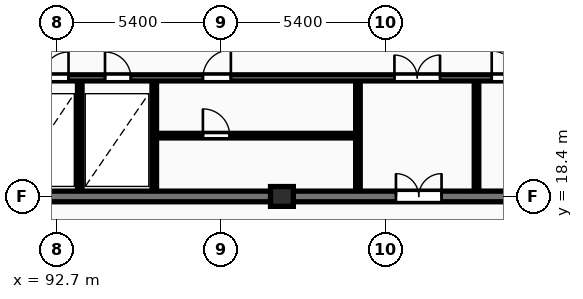
"""IFC4 building model, lengths in metres.
Left out: names, types, materials, properties, quantities, classifications, styles, units other than length and angle.
Written with IfcOpenShell. Run it as: python <this file> out.ifc"""

import sys

from ifc_helpers import new_model, si_unit, direction, frame, frame_2d, origin, origin_2d, place, context, subcontext, project, spatial, rectangle, extrude, element, fill, save


model = new_model("IFC4")
c1 = context("Model", 3, precision=1e-05, world=origin(), true_north=direction((0.0, 1.0)))
c2 = subcontext(c1, "Body", "Model", "MODEL_VIEW")
j1 = project(units=[si_unit("LENGTHUNIT", "METRE"), si_unit("PLANEANGLEUNIT", "RADIAN")], contexts=[c1])
p1 = place(None, origin())
s1 = spatial("IfcSite", under=j1, at=p1, CompositionType="ELEMENT")
p2 = place(p1, origin())
s2 = spatial("IfcBuilding", under=s1, at=p2, CompositionType="ELEMENT")
p3 = place(p2, frame((0.0, 0.0, 201.1)))
s3 = spatial("IfcBuildingStorey", under=s2, at=p3, CompositionType="ELEMENT", Elevation=201.1)
p4 = place(p3, frame((100.1, 18.4, 0.0), z_axis=(0.0, 0.0, 1.0), x_axis=(1.0, 0.0, 0.0)))
e1 = element("IfcColumn", 1, at=p4, inside=s3, PredefinedType="COLUMN", context=c2, shape_type="SweptSolid", body=[
    extrude(rectangle(XDim=0.75, YDim=0.65, at=origin_2d()), origin(), (0.0, 0.0, 1.0), 3.25),
])
p5 = place(p3, frame((81.925, 18.4, 0.0), z_axis=(0.0, 0.0, 1.0), x_axis=(1.0, 0.0, 0.0)))
e2 = element("IfcWall", 2, at=p5, inside=s3, PredefinedType="SHEAR", context=c2, shape_type="SweptSolid", body=[
    extrude(rectangle(XDim=36.265, YDim=0.35, at=frame_2d((18.132, 0.0))), origin(), (0.0, 0.0, 1.0), 3.25),
])
p6 = place(p5, frame((5.675, 0.0, 0.0)))
e3 = element("IfcOpeningElement", 3, at=p6, cuts=e2, PredefinedType="OPENING", context=c2, shape_type="SweptSolid", body=[
    extrude(rectangle(XDim=1.0, YDim=2.15, at=frame_2d((0.5, 1.075))), frame((0.0, 0.185, 0.0), z_axis=(0.0, -1.0, 0.0), x_axis=(1.0, 0.0, 0.0)), (0.0, 0.0, 1.0), 0.37),
])
p7 = place(p5, frame((21.925, 0.0, 0.0)))
e4 = element("IfcOpeningElement", 4, at=p7, cuts=e2, PredefinedType="OPENING", context=c2, shape_type="SweptSolid", body=[
    extrude(rectangle(XDim=1.5, YDim=2.2, at=frame_2d((0.75, 1.1))), frame((0.0, 0.185, 0.0), z_axis=(0.0, -1.0, 0.0), x_axis=(1.0, 0.0, 0.0)), (0.0, 0.0, 1.0), 0.37),
])
p8 = place(p5, frame((29.875, 0.0, 0.0)))
e5 = element("IfcOpeningElement", 5, at=p8, cuts=e2, PredefinedType="OPENING", context=c2, shape_type="SweptSolid", body=[
    extrude(rectangle(XDim=1.0, YDim=2.15, at=frame_2d((0.5, 1.075))), frame((0.0, 0.185, 0.0), z_axis=(0.0, -1.0, 0.0), x_axis=(1.0, 0.0, 0.0)), (0.0, 0.0, 1.0), 0.37),
])
for number, where, z_axis, x_axis in (
    (6, (93.45, 18.6, 0.0), (0.0, 0.0, 1.0), (0.0, 1.0, 0.0)),
    (7, (95.9, 18.6, 0.0), (0.0, 0.0, 1.0), (0.0, 1.0, 0.0)),
):
    element("IfcWall", number, at=place(p3, frame(where, z_axis=z_axis, x_axis=x_axis)), inside=s3, PredefinedType="PARTITIONING", context=c2, shape_type="SweptSolid", body=[
        extrude(rectangle(XDim=3.6, YDim=0.15, at=frame_2d((1.8, 0.0))), origin(), (0.0, 0.0, 1.0), 2.97),
    ])
p9 = place(p3, frame((95.9, 20.4, 0.0), z_axis=(0.0, 0.0, 1.0), x_axis=(1.0, 0.0, 0.0)))
e8 = element("IfcWall", 8, at=p9, inside=s3, PredefinedType="PARTITIONING", context=c2, shape_type="SweptSolid", body=[
    extrude(rectangle(XDim=6.7, YDim=0.15, at=frame_2d((3.35, 0.0))), origin(), (0.0, 0.0, 1.0), 2.97),
])
p10 = place(p9, frame((1.6, 0.0, 0.0)))
e9 = element("IfcOpeningElement", 9, at=p10, cuts=e8, PredefinedType="OPENING", context=c2, shape_type="SweptSolid", body=[
    extrude(rectangle(XDim=0.88, YDim=2.06, at=frame_2d((0.44, 1.03))), frame((0.0, 0.085, 0.0), z_axis=(0.0, -1.0, 0.0), x_axis=(1.0, 0.0, 0.0)), (0.0, 0.0, 1.0), 0.17),
])
for number, where, z_axis, x_axis in (
    (10, (102.6, 18.6, 0.0), (0.0, 0.0, 1.0), (0.0, 1.0, 0.0)),
    (11, (106.5, 18.6, 0.0), (0.0, 0.0, 1.0), (0.0, 1.0, 0.0)),
):
    element("IfcWall", number, at=place(p3, frame(where, z_axis=z_axis, x_axis=x_axis)), inside=s3, PredefinedType="PARTITIONING", context=c2, shape_type="SweptSolid", body=[
        extrude(rectangle(XDim=3.6, YDim=0.15, at=frame_2d((1.8, 0.0))), origin(), (0.0, 0.0, 1.0), 2.97),
    ])
p11 = place(p3, frame((91.08, 22.3, 0.0), z_axis=(0.0, 0.0, 1.0), x_axis=(1.0, 0.0, 0.0)))
e12 = element("IfcWall", 12, at=p11, inside=s3, PredefinedType="PARTITIONING", context=c2, shape_type="SweptSolid", body=[
    extrude(rectangle(XDim=19.14, YDim=0.2, at=frame_2d((9.57, 0.0))), origin(), (0.0, 0.0, 1.0), 2.97),
])
p12 = place(p11, frame((1.15, 0.0, 0.0)))
e13 = element("IfcOpeningElement", 13, at=p12, cuts=e12, PredefinedType="OPENING", context=c2, shape_type="SweptSolid", body=[
    extrude(rectangle(XDim=0.85, YDim=2.05, at=frame_2d((0.425, 1.025))), frame((0.0, 0.11, 0.0), z_axis=(0.0, -1.0, 0.0), x_axis=(1.0, 0.0, 0.0)), (0.0, 0.0, 1.0), 0.22),
])
p13 = place(p11, frame((3.2, 0.0, 0.0)))
e14 = element("IfcOpeningElement", 14, at=p13, cuts=e12, PredefinedType="OPENING", context=c2, shape_type="SweptSolid", body=[
    extrude(rectangle(XDim=0.85, YDim=2.05, at=frame_2d((0.425, 1.025))), frame((0.0, 0.11, 0.0), z_axis=(0.0, -1.0, 0.0), x_axis=(1.0, 0.0, 0.0)), (0.0, 0.0, 1.0), 0.22),
])
p14 = place(p11, frame((12.72, 0.0, 0.0)))
e15 = element("IfcOpeningElement", 15, at=p14, cuts=e12, PredefinedType="OPENING", context=c2, shape_type="SweptSolid", body=[
    extrude(rectangle(XDim=1.5, YDim=2.2, at=frame_2d((0.75, 1.1))), frame((0.0, 0.11, 0.0), z_axis=(0.0, -1.0, 0.0), x_axis=(1.0, 0.0, 0.0)), (0.0, 0.0, 1.0), 0.22),
])
p15 = place(p11, frame((6.42, 0.0, 0.0)))
e16 = element("IfcOpeningElement", 16, at=p15, cuts=e12, PredefinedType="OPENING", context=c2, shape_type="SweptSolid", body=[
    extrude(rectangle(XDim=0.92, YDim=2.08, at=frame_2d((0.46, 1.04))), frame((0.0, 0.11, 0.0), z_axis=(0.0, -1.0, 0.0), x_axis=(1.0, 0.0, 0.0)), (0.0, 0.0, 1.0), 0.22),
])
p16 = place(p11, frame((15.92, 0.0, 0.0)))
e17 = element("IfcOpeningElement", 17, at=p16, cuts=e12, PredefinedType="OPENING", context=c2, shape_type="SweptSolid", body=[
    extrude(rectangle(XDim=0.88, YDim=2.06, at=frame_2d((0.44, 1.03))), frame((0.0, 0.11, 0.0), z_axis=(0.0, -1.0, 0.0), x_axis=(1.0, 0.0, 0.0)), (0.0, 0.0, 1.0), 0.22),
])
p17 = place(p7, origin())
e18 = element("IfcDoor", 18, at=p17, inside=s3, OperationType="DOUBLE_DOOR_SINGLE_SWING", PredefinedType="DOOR", context=c2, shape_type="SweptSolid", body=[
    extrude(rectangle(XDim=1.5, YDim=2.2, at=frame_2d((0.75, 1.1))), frame((0.0, 0.025, 0.0), z_axis=(0.0, -1.0, 0.0), x_axis=(1.0, 0.0, 0.0)), (0.0, 0.0, 1.0), 0.05),
])
fill(e4, e18)
p18 = place(p10, origin())
e19 = element("IfcDoor", 19, at=p18, inside=s3, OperationType="SINGLE_SWING_LEFT", PredefinedType="DOOR", context=c2, shape_type="SweptSolid", body=[
    extrude(rectangle(XDim=0.88, YDim=2.06, at=frame_2d((0.44, 1.03))), frame((0.0, 0.025, 0.0), z_axis=(0.0, -1.0, 0.0), x_axis=(1.0, 0.0, 0.0)), (0.0, 0.0, 1.0), 0.05),
])
fill(e9, e19)
p19 = place(p12, origin())
e20 = element("IfcDoor", 20, at=p19, inside=s3, OperationType="SINGLE_SWING_RIGHT", PredefinedType="DOOR", context=c2, shape_type="SweptSolid", body=[
    extrude(rectangle(XDim=0.85, YDim=2.05, at=frame_2d((0.425, 1.025))), frame((0.0, 0.025, 0.0), z_axis=(0.0, -1.0, 0.0), x_axis=(1.0, 0.0, 0.0)), (0.0, 0.0, 1.0), 0.05),
])
fill(e13, e20)
p20 = place(p13, origin())
e21 = element("IfcDoor", 21, at=p20, inside=s3, OperationType="SINGLE_SWING_LEFT", PredefinedType="DOOR", context=c2, shape_type="SweptSolid", body=[
    extrude(rectangle(XDim=0.85, YDim=2.05, at=frame_2d((0.425, 1.025))), frame((0.0, 0.025, 0.0), z_axis=(0.0, -1.0, 0.0), x_axis=(1.0, 0.0, 0.0)), (0.0, 0.0, 1.0), 0.05),
])
fill(e14, e21)
p21 = place(p14, origin())
e22 = element("IfcDoor", 22, at=p21, inside=s3, OperationType="DOUBLE_DOOR_SINGLE_SWING", PredefinedType="DOOR", context=c2, shape_type="SweptSolid", body=[
    extrude(rectangle(XDim=1.5, YDim=2.2, at=frame_2d((0.75, 1.1))), frame((0.0, 0.025, 0.0), z_axis=(0.0, -1.0, 0.0), x_axis=(1.0, 0.0, 0.0)), (0.0, 0.0, 1.0), 0.05),
])
fill(e15, e22)
p22 = place(p15, origin())
e23 = element("IfcDoor", 23, at=p22, inside=s3, OperationType="SINGLE_SWING_RIGHT", PredefinedType="DOOR", context=c2, shape_type="SweptSolid", body=[
    extrude(rectangle(XDim=0.92, YDim=2.08, at=frame_2d((0.46, 1.04))), frame((0.0, 0.025, 0.0), z_axis=(0.0, -1.0, 0.0), x_axis=(1.0, 0.0, 0.0)), (0.0, 0.0, 1.0), 0.05),
])
fill(e16, e23)
p23 = place(p16, origin())
e24 = element("IfcDoor", 24, at=p23, inside=s3, OperationType="SINGLE_SWING_LEFT", PredefinedType="DOOR", context=c2, shape_type="SweptSolid", body=[
    extrude(rectangle(XDim=0.88, YDim=2.06, at=frame_2d((0.44, 1.03))), frame((0.0, 0.025, 0.0), z_axis=(0.0, -1.0, 0.0), x_axis=(1.0, 0.0, 0.0)), (0.0, 0.0, 1.0), 0.05),
])
fill(e17, e24)
save(model, sys.argv[1])
